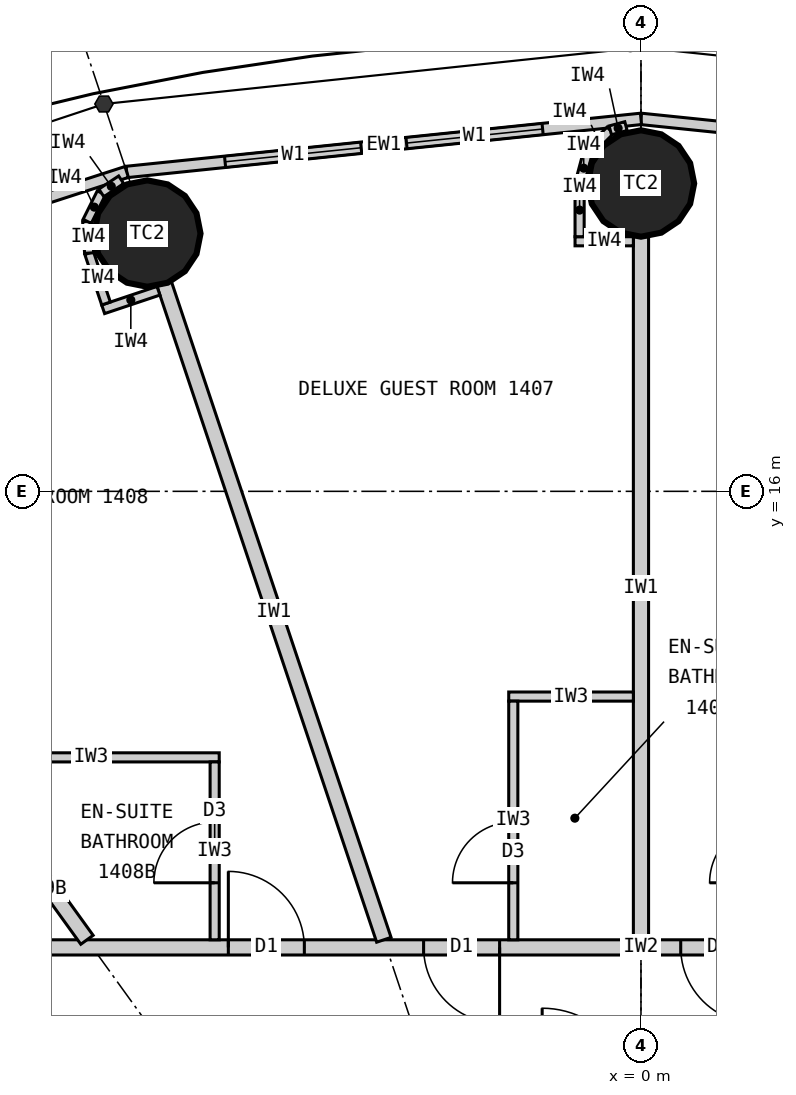
"""IFC4 building model, lengths in metres.
Left out: names, types, materials, properties, quantities, classifications, styles, units other than length and angle.
Written with IfcOpenShell. Run it as: python <this file> out.ifc"""

import sys

from ifc_helpers import new_model, si_unit, direction, frame, frame_2d, origin, origin_2d, place, context, subcontext, project, spatial, rectangle, circle, extrude, element, fill, save


model = new_model("IFC4")
c1 = context("Model", 3, precision=1e-05, world=origin(), true_north=direction((0.0, 1.0)))
c2 = subcontext(c1, "Body", "Model", "MODEL_VIEW")
j1 = project(units=[si_unit("LENGTHUNIT", "METRE"), si_unit("PLANEANGLEUNIT", "RADIAN")], contexts=[c1])
p1 = place(None, origin())
s1 = spatial("IfcSite", under=j1, at=p1, CompositionType="ELEMENT")
p2 = place(p1, origin())
s2 = spatial("IfcBuilding", under=s1, at=p2, CompositionType="ELEMENT")
p3 = place(p2, frame((0.0, 0.0, 60.6)))
s3 = spatial("IfcBuildingStorey", under=s2, at=p3, CompositionType="ELEMENT", Elevation=60.6)
for number, where, z_axis, x_axis in (
    (1, (0.0, 20.05, 0.0), (0.0, 0.0, 1.0), (1.0, 0.0, 0.0)),
    (2, (-6.495, 19.391, 0.0), (0.0, 0.0, 1.0), (1.0, 0.0, 0.0)),
):
    element("IfcColumn", number, at=place(p3, frame(where, z_axis=z_axis, x_axis=x_axis)), inside=s3, PredefinedType="COLUMN", context=c2, shape_type="SweptSolid", body=[
        extrude(circle(Radius=0.7, at=origin_2d()), origin(), (0.0, 0.0, 1.0), 3.3),
    ])
p4 = place(p3, frame((6.766, 20.202, 0.0), z_axis=(0.0, 0.0, 1.0), x_axis=(-0.994721394369, 0.102612609291, 0.0)))
e3 = element("IfcWall", 3, at=p4, inside=s3, PredefinedType="ELEMENTEDWALL", context=c2, shape_type="SweptSolid", body=[
    extrude(rectangle(XDim=6.802, YDim=0.15, at=frame_2d((3.401, 0.0))), origin(), (0.0, 0.0, 1.0), 3.12),
])
p5 = place(p4, frame((1.301, 0.0, 0.9)))
e4 = element("IfcOpeningElement", 4, at=p5, cuts=e3, PredefinedType="OPENING", context=c2, shape_type="SweptSolid", body=[
    extrude(rectangle(XDim=1.8, YDim=1.9, at=frame_2d((0.9, 0.95))), frame((0.0, 0.085, 0.0), z_axis=(0.0, -1.0, 0.0), x_axis=(1.0, 0.0, 0.0)), (0.0, 0.0, 1.0), 0.17),
])
p6 = place(p4, frame((3.701, 0.0, 0.9)))
e5 = element("IfcOpeningElement", 5, at=p6, cuts=e3, PredefinedType="OPENING", context=c2, shape_type="SweptSolid", body=[
    extrude(rectangle(XDim=1.8, YDim=1.9, at=frame_2d((0.9, 0.95))), frame((0.0, 0.085, 0.0), z_axis=(0.0, -1.0, 0.0), x_axis=(1.0, 0.0, 0.0)), (0.0, 0.0, 1.0), 0.17),
])
p7 = place(p3, frame((0.0, 20.9, 0.0), z_axis=(0.0, 0.0, 1.0), x_axis=(-0.994721394369, -0.102612609291, 0.0)))
e6 = element("IfcWall", 6, at=p7, inside=s3, PredefinedType="ELEMENTEDWALL", context=c2, shape_type="SweptSolid", body=[
    extrude(rectangle(XDim=6.802, YDim=0.15, at=frame_2d((3.401, 0.0))), origin(), (0.0, 0.0, 1.0), 3.12),
])
p8 = place(p7, frame((1.301, 0.0, 0.9)))
e7 = element("IfcOpeningElement", 7, at=p8, cuts=e6, PredefinedType="OPENING", context=c2, shape_type="SweptSolid", body=[
    extrude(rectangle(XDim=1.8, YDim=1.9, at=frame_2d((0.9, 0.95))), frame((0.0, 0.085, 0.0), z_axis=(0.0, -1.0, 0.0), x_axis=(1.0, 0.0, 0.0)), (0.0, 0.0, 1.0), 0.17),
])
p9 = place(p7, frame((3.701, 0.0, 0.9)))
e8 = element("IfcOpeningElement", 8, at=p9, cuts=e6, PredefinedType="OPENING", context=c2, shape_type="SweptSolid", body=[
    extrude(rectangle(XDim=1.8, YDim=1.9, at=frame_2d((0.9, 0.95))), frame((0.0, 0.085, 0.0), z_axis=(0.0, -1.0, 0.0), x_axis=(1.0, 0.0, 0.0)), (0.0, 0.0, 1.0), 0.17),
])
p10 = place(p3, frame((-6.766, 20.202, 0.0), z_axis=(0.0, 0.0, 1.0), x_axis=(-0.951137534625, -0.308767534285, 0.0)))
e9 = element("IfcWall", 9, at=p10, inside=s3, PredefinedType="ELEMENTEDWALL", context=c2, shape_type="SweptSolid", body=[
    extrude(rectangle(XDim=6.655, YDim=0.15, at=frame_2d((3.328, 0.0))), origin(), (0.0, 0.0, 1.0), 3.12),
])
p11 = place(p10, frame((1.228, 0.0, 0.9)))
e10 = element("IfcOpeningElement", 10, at=p11, cuts=e9, PredefinedType="OPENING", context=c2, shape_type="SweptSolid", body=[
    extrude(rectangle(XDim=1.8, YDim=1.9, at=frame_2d((0.9, 0.95))), frame((0.0, 0.085, 0.0), z_axis=(0.0, -1.0, 0.0), x_axis=(1.0, 0.0, 0.0)), (0.0, 0.0, 1.0), 0.17),
])
p12 = place(p10, frame((3.628, 0.0, 0.9)))
e11 = element("IfcOpeningElement", 11, at=p12, cuts=e9, PredefinedType="OPENING", context=c2, shape_type="SweptSolid", body=[
    extrude(rectangle(XDim=1.8, YDim=1.9, at=frame_2d((0.9, 0.95))), frame((0.0, 0.085, 0.0), z_axis=(0.0, -1.0, 0.0), x_axis=(1.0, 0.0, 0.0)), (0.0, 0.0, 1.0), 0.17),
])
p13 = place(p3, frame((-14.1, 10.0, 0.0), z_axis=(0.0, 0.0, 1.0), x_axis=(1.0, 0.0, 0.0)))
e12 = element("IfcWall", 12, at=p13, inside=s3, PredefinedType="PARTITIONING", context=c2, shape_type="SweptSolid", body=[
    extrude(rectangle(XDim=28.2, YDim=0.2, at=frame_2d((14.1, 0.0))), origin(), (0.0, 0.0, 1.0), 3.12),
])
p14 = place(p13, frame((18.529, 0.0, 0.0)))
e13 = element("IfcOpeningElement", 13, at=p14, cuts=e12, PredefinedType="OPENING", context=c2, shape_type="SweptSolid", body=[
    extrude(rectangle(XDim=1.0, YDim=2.2, at=frame_2d((0.5, 1.1))), frame((0.0, 0.11, 0.0), z_axis=(0.0, -1.0, 0.0), x_axis=(1.0, 0.0, 0.0)), (0.0, 0.0, 1.0), 0.22),
])
p15 = place(p13, frame((14.623, 0.0, 0.0)))
e14 = element("IfcOpeningElement", 14, at=p15, cuts=e12, PredefinedType="OPENING", context=c2, shape_type="SweptSolid", body=[
    extrude(rectangle(XDim=1.0, YDim=2.2, at=frame_2d((0.5, 1.1))), frame((0.0, 0.11, 0.0), z_axis=(0.0, -1.0, 0.0), x_axis=(1.0, 0.0, 0.0)), (0.0, 0.0, 1.0), 0.22),
])
p16 = place(p13, frame((11.24, 0.0, 0.0)))
e15 = element("IfcOpeningElement", 15, at=p16, cuts=e12, PredefinedType="OPENING", context=c2, shape_type="SweptSolid", body=[
    extrude(rectangle(XDim=1.0, YDim=2.2, at=frame_2d((0.5, 1.1))), frame((0.0, 0.11, 0.0), z_axis=(0.0, -1.0, 0.0), x_axis=(1.0, 0.0, 0.0)), (0.0, 0.0, 1.0), 0.22),
])
p17 = place(p13, frame((8.671, 0.0, 0.0)))
e16 = element("IfcOpeningElement", 16, at=p17, cuts=e12, PredefinedType="OPENING", context=c2, shape_type="SweptSolid", body=[
    extrude(rectangle(XDim=1.0, YDim=2.2, at=frame_2d((0.5, 1.1))), frame((0.0, 0.11, 0.0), z_axis=(0.0, -1.0, 0.0), x_axis=(1.0, 0.0, 0.0)), (0.0, 0.0, 1.0), 0.22),
])
p18 = place(p13, frame((2.801, 0.0, 0.0)))
e17 = element("IfcOpeningElement", 17, at=p18, cuts=e12, PredefinedType="OPENING", context=c2, shape_type="SweptSolid", body=[
    extrude(rectangle(XDim=1.0, YDim=2.2, at=frame_2d((0.5, 1.1))), frame((0.0, 0.11, 0.0), z_axis=(0.0, -1.0, 0.0), x_axis=(1.0, 0.0, 0.0)), (0.0, 0.0, 1.0), 0.22),
])
p19 = place(p3, frame((0.0, 10.1, 0.0), z_axis=(0.0, 0.0, 1.0), x_axis=(0.0, 1.0, 0.0)))
e18 = element("IfcWall", 18, at=p19, inside=s3, PredefinedType="PARTITIONING", context=c2, shape_type="SweptSolid", body=[
    extrude(rectangle(XDim=9.25, YDim=0.2, at=frame_2d((4.625, 0.0))), origin(), (0.0, 0.0, 1.0), 2.32),
])
p20 = place(p3, frame((-3.383, 10.1, 0.0), z_axis=(0.0, 0.0, 1.0), x_axis=(-0.31759592231, 0.948226149256, 0.0)))
e19 = element("IfcWall", 19, at=p20, inside=s3, PredefinedType="PARTITIONING", context=c2, shape_type="SweptSolid", body=[
    extrude(rectangle(XDim=9.098, YDim=0.2, at=frame_2d((4.549, 0.0))), origin(), (0.0, 0.0, 1.0), 2.32),
])
p21 = place(p3, frame((-7.289, 10.1, 0.0), z_axis=(0.0, 0.0, 1.0), x_axis=(-0.585198353053, 0.810890182197, 0.0)))
e20 = element("IfcWall", 20, at=p21, inside=s3, PredefinedType="PARTITIONING", context=c2, shape_type="SweptSolid", body=[
    extrude(rectangle(XDim=8.36, YDim=0.2, at=frame_2d((4.18, 0.0))), origin(), (0.0, 0.0, 1.0), 2.32),
])
p22 = place(p3, frame((-0.1, 13.3, 0.0), z_axis=(0.0, 0.0, 1.0), x_axis=(-1.0, 0.0, 0.0)))
e21 = element("IfcWall", 21, at=p22, inside=s3, PredefinedType="PARTITIONING", context=c2, shape_type="SweptSolid", body=[
    extrude(rectangle(XDim=1.64, YDim=0.12, at=frame_2d((0.82, 0.0))), origin(), (0.0, 0.0, 1.0), 3.12),
])
p23 = place(p3, frame((-1.68, 10.1, 0.0), z_axis=(0.0, 0.0, 1.0), x_axis=(0.0, 1.0, 0.0)))
e22 = element("IfcWall", 22, at=p23, inside=s3, PredefinedType="PARTITIONING", context=c2, shape_type="SweptSolid", body=[
    extrude(rectangle(XDim=3.14, YDim=0.12, at=frame_2d((1.57, 0.0))), origin(), (0.0, 0.0, 1.0), 3.12),
])
p24 = place(p23, frame((0.75, 0.0, 0.0)))
e23 = element("IfcOpeningElement", 23, at=p24, cuts=e22, PredefinedType="OPENING", context=c2, shape_type="SweptSolid", body=[
    extrude(rectangle(XDim=0.8, YDim=2.1, at=frame_2d((0.4, 1.05))), frame((0.0, 0.07, 0.0), z_axis=(0.0, -1.0, 0.0), x_axis=(1.0, 0.0, 0.0)), (0.0, 0.0, 1.0), 0.14),
])
p25 = place(p3, frame((-8.921, 12.5, 0.0), z_axis=(0.0, 0.0, 1.0), x_axis=(1.0, 0.0, 0.0)))
e24 = element("IfcWall", 24, at=p25, inside=s3, PredefinedType="PARTITIONING", context=c2, shape_type="SweptSolid", body=[
    extrude(rectangle(XDim=3.372, YDim=0.12, at=frame_2d((1.686, 0.0))), origin(), (0.0, 0.0, 1.0), 3.12),
])
p26 = place(p3, frame((-5.609, 10.1, 0.0), z_axis=(0.0, 0.0, 1.0), x_axis=(0.0, 1.0, 0.0)))
e25 = element("IfcWall", 25, at=p26, inside=s3, PredefinedType="PARTITIONING", context=c2, shape_type="SweptSolid", body=[
    extrude(rectangle(XDim=2.34, YDim=0.12, at=frame_2d((1.17, 0.0))), origin(), (0.0, 0.0, 1.0), 3.12),
])
p27 = place(p26, frame((0.75, 0.0, 0.0)))
e26 = element("IfcOpeningElement", 26, at=p27, cuts=e25, PredefinedType="OPENING", context=c2, shape_type="SweptSolid", body=[
    extrude(rectangle(XDim=0.8, YDim=2.1, at=frame_2d((0.4, 1.05))), frame((0.0, 0.07, 0.0), z_axis=(0.0, -1.0, 0.0), x_axis=(1.0, 0.0, 0.0)), (0.0, 0.0, 1.0), 0.14),
])
p28 = place(p3, frame((-0.1, 19.29, 0.0), z_axis=(0.0, 0.0, 1.0), x_axis=(-1.0, 0.0, 0.0)))
e27 = element("IfcWall", 27, at=p28, inside=s3, PredefinedType="PARTITIONING", context=c2, shape_type="SweptSolid", body=[
    extrude(rectangle(XDim=0.767, YDim=0.12, at=frame_2d((0.384, 0.0))), origin(), (0.0, 0.0, 1.0), 3.12),
])
p29 = place(p3, frame((-0.808, 19.35, 0.0), z_axis=(0.0, 0.0, 1.0), x_axis=(0.0, 1.0, 0.0)))
e28 = element("IfcWall", 28, at=p29, inside=s3, PredefinedType="PARTITIONING", context=c2, shape_type="SweptSolid", body=[
    extrude(rectangle(XDim=0.7, YDim=0.12, at=frame_2d((0.35, 0.0))), origin(), (0.0, 0.0, 1.0), 3.12),
])
p30 = place(p3, frame((-0.808, 20.05, 0.0), z_axis=(0.0, 0.0, 1.0), x_axis=(0.2592614205, 0.965807183573, 0.0)))
e29 = element("IfcWall", 29, at=p30, inside=s3, PredefinedType="PARTITIONING", context=c2, shape_type="SweptSolid", body=[
    extrude(rectangle(XDim=0.418, YDim=0.12, at=frame_2d((0.209, 0.0))), origin(), (0.0, 0.0, 1.0), 3.12),
])
p31 = place(p3, frame((-0.699, 20.454, 0.0), z_axis=(0.0, 0.0, 1.0), x_axis=(0.707106781187, 0.707106781187, 0.0)))
e30 = element("IfcWall", 30, at=p31, inside=s3, PredefinedType="PARTITIONING", context=c2, shape_type="SweptSolid", body=[
    extrude(rectangle(XDim=0.418, YDim=0.12, at=frame_2d((0.209, 0.0))), origin(), (0.0, 0.0, 1.0), 3.12),
])
p32 = place(p3, frame((-0.404, 20.749, 0.0), z_axis=(0.0, 0.0, 1.0), x_axis=(0.965759066438, 0.25944060128, 0.0)))
e31 = element("IfcWall", 31, at=p32, inside=s3, PredefinedType="PARTITIONING", context=c2, shape_type="SweptSolid", body=[
    extrude(rectangle(XDim=0.214, YDim=0.12, at=frame_2d((0.107, 0.0))), origin(), (0.0, 0.0, 1.0), 3.12),
])
p33 = place(p3, frame((-6.348, 18.639, 0.0), z_axis=(0.0, 0.0, 1.0), x_axis=(-0.948268951266, -0.317468102437, 0.0)))
e32 = element("IfcWall", 32, at=p33, inside=s3, PredefinedType="PARTITIONING", context=c2, shape_type="SweptSolid", body=[
    extrude(rectangle(XDim=0.768, YDim=0.12, at=frame_2d((0.384, 0.0))), origin(), (0.0, 0.0, 1.0), 3.12),
])
p34 = place(p3, frame((-7.038, 18.471, 0.0), z_axis=(0.0, 0.0, 1.0), x_axis=(-0.317378466199, 0.9482989556, 0.0)))
e33 = element("IfcWall", 33, at=p34, inside=s3, PredefinedType="PARTITIONING", context=c2, shape_type="SweptSolid", body=[
    extrude(rectangle(XDim=0.7, YDim=0.12, at=frame_2d((0.35, 0.0))), origin(), (0.0, 0.0, 1.0), 3.12),
])
p35 = place(p3, frame((-7.26, 19.135, 0.0), z_axis=(0.0, 0.0, 1.0), x_axis=(-0.0613238046, 0.99811792439, 0.0)))
e34 = element("IfcWall", 34, at=p35, inside=s3, PredefinedType="PARTITIONING", context=c2, shape_type="SweptSolid", body=[
    extrude(rectangle(XDim=0.418, YDim=0.12, at=frame_2d((0.209, 0.0))), origin(), (0.0, 0.0, 1.0), 3.12),
])
p36 = place(p3, frame((-7.286, 19.552, 0.0), z_axis=(0.0, 0.0, 1.0), x_axis=(0.445810757773, 0.89512723579, 0.0)))
e35 = element("IfcWall", 35, at=p36, inside=s3, PredefinedType="PARTITIONING", context=c2, shape_type="SweptSolid", body=[
    extrude(rectangle(XDim=0.418, YDim=0.12, at=frame_2d((0.209, 0.0))), origin(), (0.0, 0.0, 1.0), 3.12),
])
p37 = place(p3, frame((-7.1, 19.926, 0.0), z_axis=(0.0, 0.0, 1.0), x_axis=(0.833488262509, 0.552537162787, 0.0)))
e36 = element("IfcWall", 36, at=p37, inside=s3, PredefinedType="PARTITIONING", context=c2, shape_type="SweptSolid", body=[
    extrude(rectangle(XDim=0.313, YDim=0.12, at=frame_2d((0.156, 0.0))), origin(), (0.0, 0.0, 1.0), 3.12),
])
p38 = place(p8, origin())
e37 = element("IfcWindow", 37, at=p38, inside=s3, PartitioningType="SINGLE_PANEL", PredefinedType="WINDOW", context=c2, shape_type="SweptSolid", body=[
    extrude(rectangle(XDim=1.8, YDim=1.9, at=frame_2d((0.9, 0.95))), frame((0.0, 0.03, 0.0), z_axis=(0.0, -1.0, 0.0), x_axis=(1.0, 0.0, 0.0)), (0.0, 0.0, 1.0), 0.06),
])
fill(e7, e37)
p39 = place(p9, origin())
e38 = element("IfcWindow", 38, at=p39, inside=s3, PartitioningType="SINGLE_PANEL", PredefinedType="WINDOW", context=c2, shape_type="SweptSolid", body=[
    extrude(rectangle(XDim=1.8, YDim=1.9, at=frame_2d((0.9, 0.95))), frame((0.0, 0.03, 0.0), z_axis=(0.0, -1.0, 0.0), x_axis=(1.0, 0.0, 0.0)), (0.0, 0.0, 1.0), 0.06),
])
fill(e8, e38)
p40 = place(p15, origin())
e39 = element("IfcDoor", 39, at=p40, inside=s3, OperationType="SINGLE_SWING_RIGHT", PredefinedType="DOOR", context=c2, shape_type="SweptSolid", body=[
    extrude(rectangle(XDim=1.0, YDim=2.2, at=frame_2d((0.5, 1.1))), frame((0.0, 0.025, 0.0), z_axis=(0.0, -1.0, 0.0), x_axis=(1.0, 0.0, 0.0)), (0.0, 0.0, 1.0), 0.05),
])
fill(e14, e39)
p41 = place(p24, origin())
e40 = element("IfcDoor", 40, at=p41, inside=s3, OperationType="SINGLE_SWING_LEFT", PredefinedType="DOOR", context=c2, shape_type="SweptSolid", body=[
    extrude(rectangle(XDim=0.8, YDim=2.1, at=frame_2d((0.4, 1.05))), frame((0.0, 0.025, 0.0), z_axis=(0.0, -1.0, 0.0), x_axis=(1.0, 0.0, 0.0)), (0.0, 0.0, 1.0), 0.05),
])
fill(e23, e40)
p42 = place(p16, origin())
e41 = element("IfcDoor", 41, at=p42, inside=s3, OperationType="SINGLE_SWING_RIGHT", PredefinedType="DOOR", context=c2, shape_type="SweptSolid", body=[
    extrude(rectangle(XDim=1.0, YDim=2.2, at=frame_2d((0.5, 1.1))), frame((0.0, 0.025, 0.0), z_axis=(0.0, -1.0, 0.0), x_axis=(1.0, 0.0, 0.0)), (0.0, 0.0, 1.0), 0.05),
])
fill(e15, e41)
p43 = place(p27, origin())
e42 = element("IfcDoor", 42, at=p43, inside=s3, OperationType="SINGLE_SWING_LEFT", PredefinedType="DOOR", context=c2, shape_type="SweptSolid", body=[
    extrude(rectangle(XDim=0.8, YDim=2.1, at=frame_2d((0.4, 1.05))), frame((0.0, 0.025, 0.0), z_axis=(0.0, -1.0, 0.0), x_axis=(1.0, 0.0, 0.0)), (0.0, 0.0, 1.0), 0.05),
])
fill(e26, e42)
p44 = place(p17, origin())
e43 = element("IfcDoor", 43, at=p44, inside=s3, OperationType="SINGLE_SWING_LEFT", PredefinedType="DOOR", context=c2, shape_type="SweptSolid", body=[
    extrude(rectangle(XDim=1.0, YDim=2.2, at=frame_2d((0.5, 1.1))), frame((0.0, 0.025, 0.0), z_axis=(0.0, -1.0, 0.0), x_axis=(1.0, 0.0, 0.0)), (0.0, 0.0, 1.0), 0.05),
])
fill(e16, e43)
save(model, sys.argv[1])
